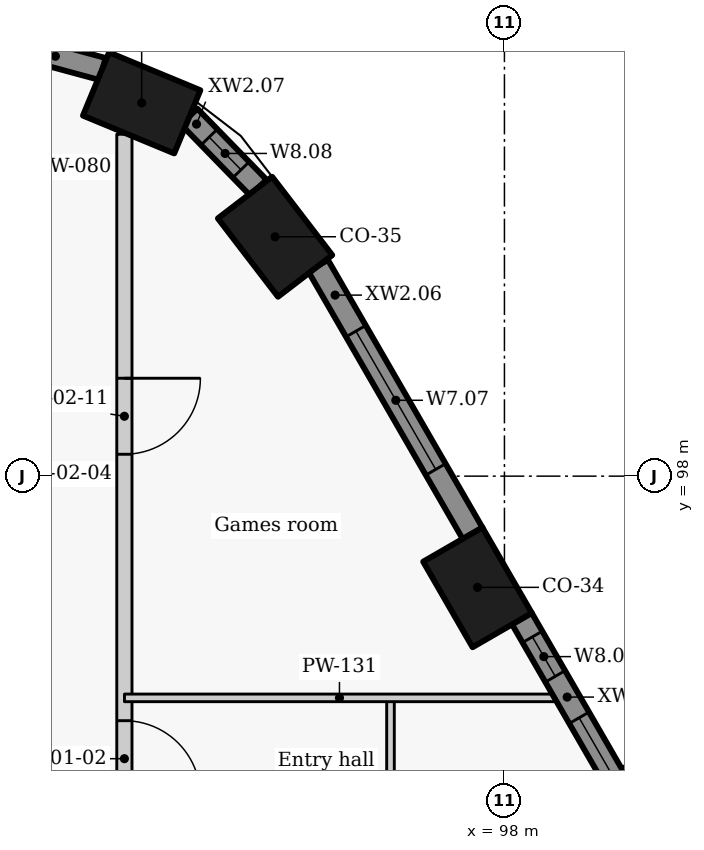
"""IFC4 building model, lengths in metres.
Left out: names, types, materials, properties, quantities, classifications, styles, units other than length and angle.
Written with IfcOpenShell. Run it as: python <this file> out.ifc"""

import sys

from ifc_helpers import new_model, si_unit, direction, frame, frame_2d, origin, origin_2d, place, context, subcontext, project, spatial, rectangle, extrude, element, fill, save


model = new_model("IFC4")
c1 = context("Model", 3, precision=1e-05, world=origin(), true_north=direction((0.0, 1.0)))
c2 = subcontext(c1, "Body", "Model", "MODEL_VIEW")
j1 = project(units=[si_unit("LENGTHUNIT", "METRE"), si_unit("PLANEANGLEUNIT", "RADIAN")], contexts=[c1])
p1 = place(None, origin())
s1 = spatial("IfcSite", under=j1, at=p1, CompositionType="ELEMENT")
p2 = place(p1, origin())
s2 = spatial("IfcBuilding", under=s1, at=p2, CompositionType="ELEMENT")
p3 = place(p2, frame((0.0, 0.0, 127.2)))
s3 = spatial("IfcBuildingStorey", under=s2, at=p3, CompositionType="ELEMENT", Elevation=127.2)
for number, where, z_axis, x_axis in (
    (1, (97.646, 96.537, 0.0), (0.0, 0.0, 1.0), (-0.5, 0.866, 0.0)),
    (2, (94.982, 101.149, 0.0), (0.0, 0.0, 1.0), (-0.609, 0.793, 0.0)),
    (3, (93.227, 102.91, 0.0), (0.0, 0.0, 1.0), (-0.924, 0.383, 0.0)),
):
    element("IfcColumn", number, at=place(p3, frame(where, z_axis=z_axis, x_axis=x_axis)), inside=s3, PredefinedType="COLUMN", context=c2, shape_type="SweptSolid", body=[
        extrude(rectangle(XDim=1.3, YDim=0.9, at=origin_2d()), origin(), (0.0, 0.0, 1.0), 3.3),
    ])
p4 = place(p3, frame((100.245, 92.634, 0.0), z_axis=(0.0, 0.0, 1.0), x_axis=(-0.500031546601, 0.86600718958, 0.0)))
e4 = element("IfcWall", 4, at=p4, inside=s3, PredefinedType="SOLIDWALL", context=c2, shape_type="SweptSolid", body=[
    extrude(rectangle(XDim=4.034, YDim=0.3, at=frame_2d((2.017, 0.0))), origin(), (0.0, 0.0, 1.0), 2.425),
])
p5 = place(p4, frame((0.425, 0.0, 0.9)))
e5 = element("IfcOpeningElement", 5, at=p5, cuts=e4, PredefinedType="OPENING", context=c2, shape_type="SweptSolid", body=[
    extrude(rectangle(XDim=2.1, YDim=1.1, at=frame_2d((1.05, 0.55))), frame((0.0, 0.16, 0.0), z_axis=(0.0, -1.0, 0.0), x_axis=(1.0, 0.0, 0.0)), (0.0, 0.0, 1.0), 0.32),
])
p6 = place(p4, frame((3.154, 0.0, 0.9)))
e6 = element("IfcOpeningElement", 6, at=p6, cuts=e4, PredefinedType="OPENING", context=c2, shape_type="SweptSolid", body=[
    extrude(rectangle(XDim=0.6, YDim=1.1, at=frame_2d((0.3, 0.55))), frame((0.0, 0.16, 0.0), z_axis=(0.0, -1.0, 0.0), x_axis=(1.0, 0.0, 0.0)), (0.0, 0.0, 1.0), 0.32),
])
p7 = place(p3, frame((97.582, 97.247, 0.0), z_axis=(0.0, 0.0, 1.0), x_axis=(-0.500018589245, 0.866014671013, 0.0)))
e7 = element("IfcWall", 7, at=p7, inside=s3, PredefinedType="SOLIDWALL", context=c2, shape_type="SweptSolid", body=[
    extrude(rectangle(XDim=4.068, YDim=0.3, at=frame_2d((2.034, 0.0))), origin(), (0.0, 0.0, 1.0), 2.425),
])
p8 = place(p7, frame((0.973, 0.0, 0.9)))
e8 = element("IfcOpeningElement", 8, at=p8, cuts=e7, PredefinedType="OPENING", context=c2, shape_type="SweptSolid", body=[
    extrude(rectangle(XDim=2.1, YDim=1.1, at=frame_2d((1.05, 0.55))), frame((0.0, 0.16, 0.0), z_axis=(0.0, -1.0, 0.0), x_axis=(1.0, 0.0, 0.0)), (0.0, 0.0, 1.0), 0.32),
])
p9 = place(p3, frame((94.763, 101.795, 0.0), z_axis=(0.0, 0.0, 1.0), x_axis=(-0.697598997785, 0.716488407645, 0.0)))
e9 = element("IfcWall", 9, at=p9, inside=s3, PredefinedType="SOLIDWALL", context=c2, shape_type="SweptSolid", body=[
    extrude(rectangle(XDim=1.305, YDim=0.3, at=frame_2d((0.653, 0.0))), origin(), (0.0, 0.0, 1.0), 2.425),
])
p10 = place(p9, frame((0.328, 0.0, 0.9)))
e10 = element("IfcOpeningElement", 10, at=p10, cuts=e9, PredefinedType="OPENING", context=c2, shape_type="SweptSolid", body=[
    extrude(rectangle(XDim=0.6, YDim=1.1, at=frame_2d((0.3, 0.55))), frame((0.0, 0.16, 0.0), z_axis=(0.0, -1.0, 0.0), x_axis=(1.0, 0.0, 0.0)), (0.0, 0.0, 1.0), 0.32),
])
p11 = place(p3, frame((92.713, 103.356, 0.0), z_axis=(0.0, 0.0, 1.0), x_axis=(-0.965274225809, 0.26123872031, 0.0)))
e11 = element("IfcWall", 11, at=p11, inside=s3, PredefinedType="SOLIDWALL", context=c2, shape_type="SweptSolid", body=[
    extrude(rectangle(XDim=1.287, YDim=0.3, at=frame_2d((0.644, 0.0))), origin(), (0.0, 0.0, 1.0), 2.425),
])
p12 = place(p3, frame((93.0, 102.498, 0.0), z_axis=(0.0, 0.0, 1.0), x_axis=(0.0, -1.0, 0.0)))
e12 = element("IfcWall", 12, at=p12, inside=s3, PredefinedType="PARTITIONING", context=c2, shape_type="SweptSolid", body=[
    extrude(rectangle(XDim=45.665, YDim=0.2, at=frame_2d((22.833, 0.0))), origin(), (0.0, 0.0, 1.0), 2.405),
])
p13 = place(p12, frame((34.581, 0.0, 0.0)))
e13 = element("IfcOpeningElement", 13, at=p13, cuts=e12, PredefinedType="OPENING", context=c2, shape_type="SweptSolid", body=[
    extrude(rectangle(XDim=1.0, YDim=2.1, at=frame_2d((0.5, 1.05))), frame((0.0, 0.11, 0.0), z_axis=(0.0, -1.0, 0.0), x_axis=(1.0, 0.0, 0.0)), (0.0, 0.0, 1.0), 0.22),
])
p14 = place(p12, frame((23.223, 0.0, 0.0)))
e14 = element("IfcOpeningElement", 14, at=p14, cuts=e12, PredefinedType="OPENING", context=c2, shape_type="SweptSolid", body=[
    extrude(rectangle(XDim=1.0, YDim=2.1, at=frame_2d((0.5, 1.05))), frame((0.0, 0.11, 0.0), z_axis=(0.0, -1.0, 0.0), x_axis=(1.0, 0.0, 0.0)), (0.0, 0.0, 1.0), 0.22),
])
p15 = place(p12, frame((7.715, 0.0, 0.0)))
e15 = element("IfcOpeningElement", 15, at=p15, cuts=e12, PredefinedType="OPENING", context=c2, shape_type="SweptSolid", body=[
    extrude(rectangle(XDim=1.0, YDim=2.1, at=frame_2d((0.5, 1.05))), frame((0.0, 0.11, 0.0), z_axis=(0.0, -1.0, 0.0), x_axis=(1.0, 0.0, 0.0)), (0.0, 0.0, 1.0), 0.22),
])
p16 = place(p12, frame((3.21, 0.0, 0.0)))
e16 = element("IfcOpeningElement", 16, at=p16, cuts=e12, PredefinedType="OPENING", context=c2, shape_type="SweptSolid", body=[
    extrude(rectangle(XDim=1.0, YDim=2.1, at=frame_2d((0.5, 1.05))), frame((0.0, 0.11, 0.0), z_axis=(0.0, -1.0, 0.0), x_axis=(1.0, 0.0, 0.0)), (0.0, 0.0, 1.0), 0.22),
])
p17 = place(p3, frame((96.501, 95.083, 0.0), z_axis=(0.0, 0.0, 1.0), x_axis=(0.0, -1.0, 0.0)))
e17 = element("IfcWall", 17, at=p17, inside=s3, PredefinedType="PARTITIONING", context=c2, shape_type="SweptSolid", body=[
    extrude(rectangle(XDim=8.083, YDim=0.1, at=frame_2d((4.042, 0.0))), origin(), (0.0, 0.0, 1.0), 3.025),
])
p18 = place(p17, frame((3.591, 0.0, 0.0)))
e18 = element("IfcOpeningElement", 18, at=p18, cuts=e17, PredefinedType="OPENING", context=c2, shape_type="SweptSolid", body=[
    extrude(rectangle(XDim=0.9, YDim=2.1, at=frame_2d((0.45, 1.05))), frame((0.0, 0.06, 0.0), z_axis=(0.0, -1.0, 0.0), x_axis=(1.0, 0.0, 0.0)), (0.0, 0.0, 1.0), 0.12),
])
p19 = place(p3, frame((93.001, 95.083, 0.0), z_axis=(0.0, 0.0, 1.0), x_axis=(1.0, 0.0, 0.0)))
e19 = element("IfcWall", 19, at=p19, inside=s3, PredefinedType="PARTITIONING", context=c2, shape_type="SweptSolid", body=[
    extrude(rectangle(XDim=5.657, YDim=0.1, at=frame_2d((2.829, 0.0))), origin(), (0.0, 0.0, 1.0), 2.405),
])
p20 = place(p5, origin())
e20 = element("IfcWindow", 20, at=p20, inside=s3, PartitioningType="SINGLE_PANEL", PredefinedType="WINDOW", context=c2, shape_type="SweptSolid", body=[
    extrude(rectangle(XDim=2.1, YDim=1.1, at=frame_2d((1.05, 0.55))), frame((0.0, 0.03, 0.0), z_axis=(0.0, -1.0, 0.0), x_axis=(1.0, 0.0, 0.0)), (0.0, 0.0, 1.0), 0.06),
])
fill(e5, e20)
p21 = place(p6, origin())
e21 = element("IfcWindow", 21, at=p21, inside=s3, PartitioningType="SINGLE_PANEL", PredefinedType="WINDOW", context=c2, shape_type="SweptSolid", body=[
    extrude(rectangle(XDim=0.6, YDim=1.1, at=frame_2d((0.3, 0.55))), frame((0.0, 0.03, 0.0), z_axis=(0.0, -1.0, 0.0), x_axis=(1.0, 0.0, 0.0)), (0.0, 0.0, 1.0), 0.06),
])
fill(e6, e21)
p22 = place(p8, origin())
e22 = element("IfcWindow", 22, at=p22, inside=s3, PartitioningType="SINGLE_PANEL", PredefinedType="WINDOW", context=c2, shape_type="SweptSolid", body=[
    extrude(rectangle(XDim=2.1, YDim=1.1, at=frame_2d((1.05, 0.55))), frame((0.0, 0.03, 0.0), z_axis=(0.0, -1.0, 0.0), x_axis=(1.0, 0.0, 0.0)), (0.0, 0.0, 1.0), 0.06),
])
fill(e8, e22)
p23 = place(p10, origin())
e23 = element("IfcWindow", 23, at=p23, inside=s3, PartitioningType="SINGLE_PANEL", PredefinedType="WINDOW", context=c2, shape_type="SweptSolid", body=[
    extrude(rectangle(XDim=0.6, YDim=1.1, at=frame_2d((0.3, 0.55))), frame((0.0, 0.03, 0.0), z_axis=(0.0, -1.0, 0.0), x_axis=(1.0, 0.0, 0.0)), (0.0, 0.0, 1.0), 0.06),
])
fill(e10, e23)
p24 = place(p15, origin())
e24 = element("IfcDoor", 24, at=p24, inside=s3, OperationType="SINGLE_SWING_RIGHT", PredefinedType="DOOR", context=c2, shape_type="SweptSolid", body=[
    extrude(rectangle(XDim=1.0, YDim=2.1, at=frame_2d((0.5, 1.05))), frame((0.0, 0.025, 0.0), z_axis=(0.0, -1.0, 0.0), x_axis=(1.0, 0.0, 0.0)), (0.0, 0.0, 1.0), 0.05),
])
fill(e15, e24)
p25 = place(p16, origin())
e25 = element("IfcDoor", 25, at=p25, inside=s3, OperationType="SINGLE_SWING_LEFT", PredefinedType="DOOR", context=c2, shape_type="SweptSolid", body=[
    extrude(rectangle(XDim=1.0, YDim=2.1, at=frame_2d((0.5, 1.05))), frame((0.0, 0.025, 0.0), z_axis=(0.0, -1.0, 0.0), x_axis=(1.0, 0.0, 0.0)), (0.0, 0.0, 1.0), 0.05),
])
fill(e16, e25)
save(model, sys.argv[1])
